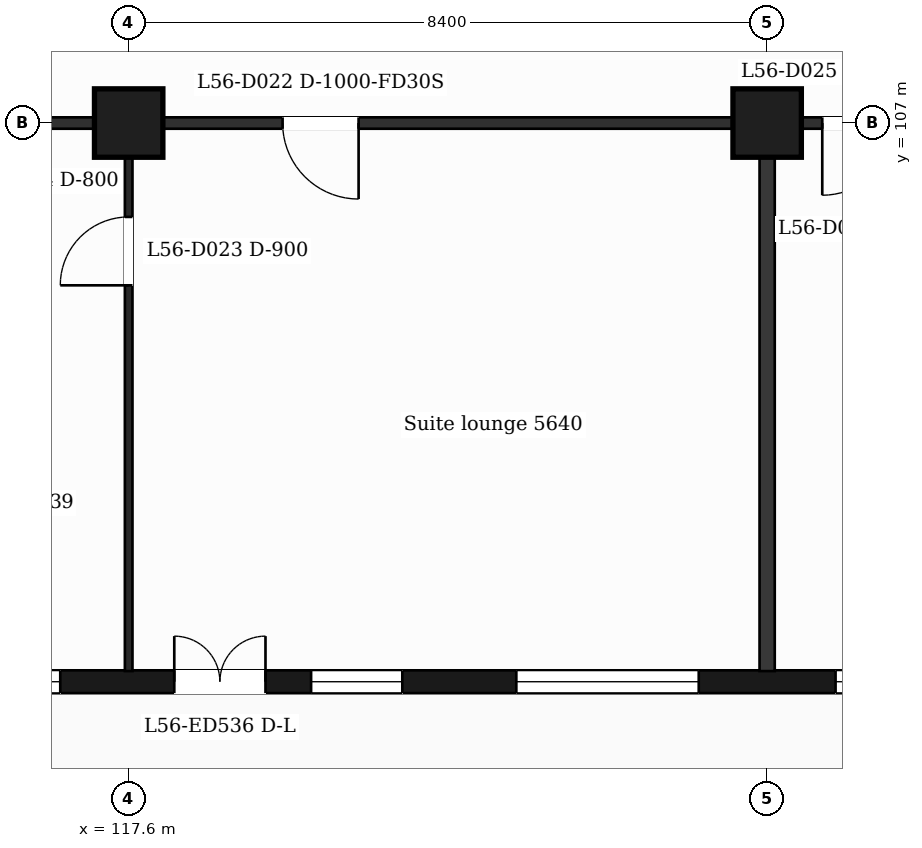
"""IFC4 building model, lengths in metres.
Left out: names, types, materials, properties, quantities, classifications, styles, units other than length and angle.
Written with IfcOpenShell. Run it as: python <this file> out.ifc"""

import sys

from ifc_helpers import new_model, si_unit, direction, frame, frame_2d, origin, origin_2d, place, context, subcontext, project, spatial, rectangle, extrude, element, fill, save


model = new_model("IFC4")
c1 = context("Model", 3, precision=1e-05, world=origin(), true_north=direction((0.0, 1.0)))
c2 = subcontext(c1, "Body", "Model", "MODEL_VIEW")
j1 = project(units=[si_unit("LENGTHUNIT", "METRE"), si_unit("PLANEANGLEUNIT", "RADIAN")], contexts=[c1])
p1 = place(None, origin())
s1 = spatial("IfcSite", under=j1, at=p1, CompositionType="ELEMENT")
p2 = place(p1, origin())
s2 = spatial("IfcBuilding", under=s1, at=p2, CompositionType="ELEMENT")
p3 = place(p2, frame((0.0, 0.0, 231.8)))
s3 = spatial("IfcBuildingStorey", under=s2, at=p3, CompositionType="ELEMENT", Elevation=231.8)
for number, where, z_axis, x_axis in (
    (1, (117.6, 107.0, 0.0), (0.0, 0.0, 1.0), (1.0, 0.0, 0.0)),
    (2, (126.0, 107.0, 0.0), (0.0, 0.0, 1.0), (1.0, 0.0, 0.0)),
):
    element("IfcColumn", number, at=place(p3, frame(where, z_axis=z_axis, x_axis=x_axis)), inside=s3, PredefinedType="COLUMN", context=c2, shape_type="SweptSolid", body=[
        extrude(rectangle(XDim=0.9, YDim=0.9, at=origin_2d()), origin(), (0.0, 0.0, 1.0), 3.7),
    ])
p4 = place(p3, frame((89.85, 99.65, 0.0), z_axis=(0.0, 0.0, 1.0), x_axis=(1.0, 0.0, 0.0)))
e3 = element("IfcWall", 3, at=p4, inside=s3, PredefinedType="SOLIDWALL", context=c2, shape_type="SweptSolid", body=[
    extrude(rectangle(XDim=47.25, YDim=0.3, at=frame_2d((23.625, 0.0))), origin(), (0.0, 0.0, 1.0), 3.38),
])
p5 = place(p4, frame((0.725, 0.0, 0.9)))
e4 = element("IfcOpeningElement", 4, at=p5, cuts=e3, PredefinedType="OPENING", context=c2, shape_type="SweptSolid", body=[
    extrude(rectangle(XDim=1.2, YDim=2.1, at=frame_2d((0.6, 1.05))), frame((0.0, 0.16, 0.0), z_axis=(0.0, -1.0, 0.0), x_axis=(1.0, 0.0, 0.0)), (0.0, 0.0, 1.0), 0.32),
])
p6 = place(p4, frame((3.45, 0.0, 0.9)))
e5 = element("IfcOpeningElement", 5, at=p6, cuts=e3, PredefinedType="OPENING", context=c2, shape_type="SweptSolid", body=[
    extrude(rectangle(XDim=2.4, YDim=2.1, at=frame_2d((1.2, 1.05))), frame((0.0, 0.16, 0.0), z_axis=(0.0, -1.0, 0.0), x_axis=(1.0, 0.0, 0.0)), (0.0, 0.0, 1.0), 0.32),
])
p7 = place(p4, frame((7.65, 0.0, 0.9)))
e6 = element("IfcOpeningElement", 6, at=p7, cuts=e3, PredefinedType="OPENING", context=c2, shape_type="SweptSolid", body=[
    extrude(rectangle(XDim=2.4, YDim=2.1, at=frame_2d((1.2, 1.05))), frame((0.0, 0.16, 0.0), z_axis=(0.0, -1.0, 0.0), x_axis=(1.0, 0.0, 0.0)), (0.0, 0.0, 1.0), 0.32),
])
p8 = place(p4, frame((12.45, 0.0, 0.9)))
e7 = element("IfcOpeningElement", 7, at=p8, cuts=e3, PredefinedType="OPENING", context=c2, shape_type="SweptSolid", body=[
    extrude(rectangle(XDim=1.2, YDim=2.1, at=frame_2d((0.6, 1.05))), frame((0.0, 0.16, 0.0), z_axis=(0.0, -1.0, 0.0), x_axis=(1.0, 0.0, 0.0)), (0.0, 0.0, 1.0), 0.32),
])
p9 = place(p4, frame((16.65, 0.0, 0.9)))
e8 = element("IfcOpeningElement", 8, at=p9, cuts=e3, PredefinedType="OPENING", context=c2, shape_type="SweptSolid", body=[
    extrude(rectangle(XDim=1.2, YDim=2.1, at=frame_2d((0.6, 1.05))), frame((0.0, 0.16, 0.0), z_axis=(0.0, -1.0, 0.0), x_axis=(1.0, 0.0, 0.0)), (0.0, 0.0, 1.0), 0.32),
])
p10 = place(p4, frame((19.95, 0.0, 0.0)))
e9 = element("IfcOpeningElement", 9, at=p10, cuts=e3, PredefinedType="OPENING", context=c2, shape_type="SweptSolid", body=[
    extrude(rectangle(XDim=1.2, YDim=2.4, at=frame_2d((0.6, 1.2))), frame((0.0, 0.16, 0.0), z_axis=(0.0, -1.0, 0.0), x_axis=(1.0, 0.0, 0.0)), (0.0, 0.0, 1.0), 0.32),
])
p11 = place(p4, frame((21.75, 0.0, 0.9)))
e10 = element("IfcOpeningElement", 10, at=p11, cuts=e3, PredefinedType="OPENING", context=c2, shape_type="SweptSolid", body=[
    extrude(rectangle(XDim=1.2, YDim=2.1, at=frame_2d((0.6, 1.05))), frame((0.0, 0.16, 0.0), z_axis=(0.0, -1.0, 0.0), x_axis=(1.0, 0.0, 0.0)), (0.0, 0.0, 1.0), 0.32),
])
p12 = place(p4, frame((24.45, 0.0, 0.9)))
e11 = element("IfcOpeningElement", 11, at=p12, cuts=e3, PredefinedType="OPENING", context=c2, shape_type="SweptSolid", body=[
    extrude(rectangle(XDim=2.4, YDim=2.1, at=frame_2d((1.2, 1.05))), frame((0.0, 0.16, 0.0), z_axis=(0.0, -1.0, 0.0), x_axis=(1.0, 0.0, 0.0)), (0.0, 0.0, 1.0), 0.32),
])
p13 = place(p4, frame((28.35, 0.0, 0.0)))
e12 = element("IfcOpeningElement", 12, at=p13, cuts=e3, PredefinedType="OPENING", context=c2, shape_type="SweptSolid", body=[
    extrude(rectangle(XDim=1.2, YDim=2.4, at=frame_2d((0.6, 1.2))), frame((0.0, 0.16, 0.0), z_axis=(0.0, -1.0, 0.0), x_axis=(1.0, 0.0, 0.0)), (0.0, 0.0, 1.0), 0.32),
])
p14 = place(p4, frame((30.15, 0.0, 0.9)))
e13 = element("IfcOpeningElement", 13, at=p14, cuts=e3, PredefinedType="OPENING", context=c2, shape_type="SweptSolid", body=[
    extrude(rectangle(XDim=1.2, YDim=2.1, at=frame_2d((0.6, 1.05))), frame((0.0, 0.16, 0.0), z_axis=(0.0, -1.0, 0.0), x_axis=(1.0, 0.0, 0.0)), (0.0, 0.0, 1.0), 0.32),
])
p15 = place(p4, frame((32.85, 0.0, 0.9)))
e14 = element("IfcOpeningElement", 14, at=p15, cuts=e3, PredefinedType="OPENING", context=c2, shape_type="SweptSolid", body=[
    extrude(rectangle(XDim=2.4, YDim=2.1, at=frame_2d((1.2, 1.05))), frame((0.0, 0.16, 0.0), z_axis=(0.0, -1.0, 0.0), x_axis=(1.0, 0.0, 0.0)), (0.0, 0.0, 1.0), 0.32),
])
p16 = place(p4, frame((37.05, 0.0, 0.9)))
e15 = element("IfcOpeningElement", 15, at=p16, cuts=e3, PredefinedType="OPENING", context=c2, shape_type="SweptSolid", body=[
    extrude(rectangle(XDim=2.4, YDim=2.1, at=frame_2d((1.2, 1.05))), frame((0.0, 0.16, 0.0), z_axis=(0.0, -1.0, 0.0), x_axis=(1.0, 0.0, 0.0)), (0.0, 0.0, 1.0), 0.32),
])
p17 = place(p4, frame((41.85, 0.0, 0.9)))
e16 = element("IfcOpeningElement", 16, at=p17, cuts=e3, PredefinedType="OPENING", context=c2, shape_type="SweptSolid", body=[
    extrude(rectangle(XDim=1.2, YDim=2.1, at=frame_2d((0.6, 1.05))), frame((0.0, 0.16, 0.0), z_axis=(0.0, -1.0, 0.0), x_axis=(1.0, 0.0, 0.0)), (0.0, 0.0, 1.0), 0.32),
])
p18 = place(p4, frame((45.25, 0.0, 0.9)))
e17 = element("IfcOpeningElement", 17, at=p18, cuts=e3, PredefinedType="OPENING", context=c2, shape_type="SweptSolid", body=[
    extrude(rectangle(XDim=1.2, YDim=2.1, at=frame_2d((0.6, 1.05))), frame((0.0, 0.16, 0.0), z_axis=(0.0, -1.0, 0.0), x_axis=(1.0, 0.0, 0.0)), (0.0, 0.0, 1.0), 0.32),
])
p19 = place(p3, frame((87.018, 107.0, 0.0), z_axis=(0.0, 0.0, 1.0), x_axis=(1.0, 0.0, 0.0)))
e18 = element("IfcWall", 18, at=p19, inside=s3, PredefinedType="PARTITIONING", context=c2, shape_type="SweptSolid", body=[
    extrude(rectangle(XDim=52.765, YDim=0.15, at=frame_2d((26.382, 0.0))), origin(), (0.0, 0.0, 1.0), 3.38),
])
p20 = place(p19, frame((0.707, 0.0, 0.0)))
e19 = element("IfcOpeningElement", 19, at=p20, cuts=e18, PredefinedType="OPENING", context=c2, shape_type="SweptSolid", body=[
    extrude(rectangle(XDim=0.95, YDim=2.1, at=frame_2d((0.475, 1.05))), frame((0.0, 0.085, 0.0), z_axis=(0.0, -1.0, 0.0), x_axis=(1.0, 0.0, 0.0)), (0.0, 0.0, 1.0), 0.17),
])
p21 = place(p19, frame((8.412, 0.0, 0.0)))
e20 = element("IfcOpeningElement", 20, at=p21, cuts=e18, PredefinedType="OPENING", context=c2, shape_type="SweptSolid", body=[
    extrude(rectangle(XDim=1.0, YDim=2.1, at=frame_2d((0.5, 1.05))), frame((0.0, 0.085, 0.0), z_axis=(0.0, -1.0, 0.0), x_axis=(1.0, 0.0, 0.0)), (0.0, 0.0, 1.0), 0.17),
])
p22 = place(p19, frame((20.482, 0.0, 0.0)))
e21 = element("IfcOpeningElement", 21, at=p22, cuts=e18, PredefinedType="OPENING", context=c2, shape_type="SweptSolid", body=[
    extrude(rectangle(XDim=1.0, YDim=2.1, at=frame_2d((0.5, 1.05))), frame((0.0, 0.085, 0.0), z_axis=(0.0, -1.0, 0.0), x_axis=(1.0, 0.0, 0.0)), (0.0, 0.0, 1.0), 0.17),
])
p23 = place(p19, frame((22.882, 0.0, 0.0)))
e22 = element("IfcOpeningElement", 22, at=p23, cuts=e18, PredefinedType="OPENING", context=c2, shape_type="SweptSolid", body=[
    extrude(rectangle(XDim=1.0, YDim=2.1, at=frame_2d((0.5, 1.05))), frame((0.0, 0.085, 0.0), z_axis=(0.0, -1.0, 0.0), x_axis=(1.0, 0.0, 0.0)), (0.0, 0.0, 1.0), 0.17),
])
p24 = place(p19, frame((32.607, 0.0, 0.0)))
e23 = element("IfcOpeningElement", 23, at=p24, cuts=e18, PredefinedType="OPENING", context=c2, shape_type="SweptSolid", body=[
    extrude(rectangle(XDim=1.0, YDim=2.1, at=frame_2d((0.5, 1.05))), frame((0.0, 0.085, 0.0), z_axis=(0.0, -1.0, 0.0), x_axis=(1.0, 0.0, 0.0)), (0.0, 0.0, 1.0), 0.17),
])
p25 = place(p19, frame((39.707, 0.0, 0.0)))
e24 = element("IfcOpeningElement", 24, at=p25, cuts=e18, PredefinedType="OPENING", context=c2, shape_type="SweptSolid", body=[
    extrude(rectangle(XDim=0.95, YDim=2.1, at=frame_2d((0.475, 1.05))), frame((0.0, 0.085, 0.0), z_axis=(0.0, -1.0, 0.0), x_axis=(1.0, 0.0, 0.0)), (0.0, 0.0, 1.0), 0.17),
])
p26 = place(p19, frame((43.457, 0.0, 0.0)))
e25 = element("IfcOpeningElement", 25, at=p26, cuts=e18, PredefinedType="OPENING", context=c2, shape_type="SweptSolid", body=[
    extrude(rectangle(XDim=0.95, YDim=2.1, at=frame_2d((0.475, 1.05))), frame((0.0, 0.085, 0.0), z_axis=(0.0, -1.0, 0.0), x_axis=(1.0, 0.0, 0.0)), (0.0, 0.0, 1.0), 0.17),
])
p27 = place(p19, frame((49.285, 0.0, 0.0)))
e26 = element("IfcOpeningElement", 26, at=p27, cuts=e18, PredefinedType="OPENING", context=c2, shape_type="SweptSolid", body=[
    extrude(rectangle(XDim=0.95, YDim=2.1, at=frame_2d((0.475, 1.05))), frame((0.0, 0.085, 0.0), z_axis=(0.0, -1.0, 0.0), x_axis=(1.0, 0.0, 0.0)), (0.0, 0.0, 1.0), 0.17),
])
p28 = place(p3, frame((117.6, 99.79, 0.0), z_axis=(0.0, 0.0, 1.0), x_axis=(0.0, 1.0, 0.0)))
e27 = element("IfcWall", 27, at=p28, inside=s3, PredefinedType="PARTITIONING", context=c2, shape_type="SweptSolid", body=[
    extrude(rectangle(XDim=7.135, YDim=0.1, at=frame_2d((3.567, 0.0))), origin(), (0.0, 0.0, 1.0), 3.38),
])
p29 = place(p28, frame((5.075, 0.0, 0.0)))
e28 = element("IfcOpeningElement", 28, at=p29, cuts=e27, PredefinedType="OPENING", context=c2, shape_type="SweptSolid", body=[
    extrude(rectangle(XDim=0.9, YDim=2.1, at=frame_2d((0.45, 1.05))), frame((0.0, 0.06, 0.0), z_axis=(0.0, -1.0, 0.0), x_axis=(1.0, 0.0, 0.0)), (0.0, 0.0, 1.0), 0.12),
])
p30 = place(p3, frame((126.0, 99.79, 0.0), z_axis=(0.0, 0.0, 1.0), x_axis=(0.0, 1.0, 0.0)))
e29 = element("IfcWall", 29, at=p30, inside=s3, PredefinedType="PARTITIONING", context=c2, shape_type="SweptSolid", body=[
    extrude(rectangle(XDim=7.135, YDim=0.2, at=frame_2d((3.567, 0.0))), origin(), (0.0, 0.0, 1.0), 3.38),
])
p31 = place(p12, origin())
e30 = element("IfcWindow", 30, at=p31, inside=s3, PartitioningType="SINGLE_PANEL", PredefinedType="WINDOW", context=c2, shape_type="SweptSolid", body=[
    extrude(rectangle(XDim=2.4, YDim=2.1, at=frame_2d((1.2, 1.05))), frame((0.0, 0.03, 0.0), z_axis=(0.0, -1.0, 0.0), x_axis=(1.0, 0.0, 0.0)), (0.0, 0.0, 1.0), 0.06),
])
fill(e11, e30)
p32 = place(p13, origin())
e31 = element("IfcDoor", 31, at=p32, inside=s3, OperationType="DOUBLE_DOOR_SINGLE_SWING", PredefinedType="DOOR", context=c2, shape_type="SweptSolid", body=[
    extrude(rectangle(XDim=1.2, YDim=2.4, at=frame_2d((0.6, 1.2))), frame((0.0, 0.025, 0.0), z_axis=(0.0, -1.0, 0.0), x_axis=(1.0, 0.0, 0.0)), (0.0, 0.0, 1.0), 0.05),
])
fill(e12, e31)
p33 = place(p14, origin())
e32 = element("IfcWindow", 32, at=p33, inside=s3, PartitioningType="SINGLE_PANEL", PredefinedType="WINDOW", context=c2, shape_type="SweptSolid", body=[
    extrude(rectangle(XDim=1.2, YDim=2.1, at=frame_2d((0.6, 1.05))), frame((0.0, 0.03, 0.0), z_axis=(0.0, -1.0, 0.0), x_axis=(1.0, 0.0, 0.0)), (0.0, 0.0, 1.0), 0.06),
])
fill(e13, e32)
p34 = place(p15, origin())
e33 = element("IfcWindow", 33, at=p34, inside=s3, PartitioningType="SINGLE_PANEL", PredefinedType="WINDOW", context=c2, shape_type="SweptSolid", body=[
    extrude(rectangle(XDim=2.4, YDim=2.1, at=frame_2d((1.2, 1.05))), frame((0.0, 0.03, 0.0), z_axis=(0.0, -1.0, 0.0), x_axis=(1.0, 0.0, 0.0)), (0.0, 0.0, 1.0), 0.06),
])
fill(e14, e33)
p35 = place(p16, origin())
e34 = element("IfcWindow", 34, at=p35, inside=s3, PartitioningType="SINGLE_PANEL", PredefinedType="WINDOW", context=c2, shape_type="SweptSolid", body=[
    extrude(rectangle(XDim=2.4, YDim=2.1, at=frame_2d((1.2, 1.05))), frame((0.0, 0.03, 0.0), z_axis=(0.0, -1.0, 0.0), x_axis=(1.0, 0.0, 0.0)), (0.0, 0.0, 1.0), 0.06),
])
fill(e15, e34)
p36 = place(p24, origin())
e35 = element("IfcDoor", 35, at=p36, inside=s3, OperationType="SINGLE_SWING_RIGHT", PredefinedType="DOOR", context=c2, shape_type="SweptSolid", body=[
    extrude(rectangle(XDim=1.0, YDim=2.1, at=frame_2d((0.5, 1.05))), frame((0.0, 0.025, 0.0), z_axis=(0.0, -1.0, 0.0), x_axis=(1.0, 0.0, 0.0)), (0.0, 0.0, 1.0), 0.05),
])
fill(e23, e35)
p37 = place(p29, origin())
e36 = element("IfcDoor", 36, at=p37, inside=s3, OperationType="SINGLE_SWING_LEFT", PredefinedType="DOOR", context=c2, shape_type="SweptSolid", body=[
    extrude(rectangle(XDim=0.9, YDim=2.1, at=frame_2d((0.45, 1.05))), frame((0.0, 0.025, 0.0), z_axis=(0.0, -1.0, 0.0), x_axis=(1.0, 0.0, 0.0)), (0.0, 0.0, 1.0), 0.05),
])
fill(e28, e36)
p38 = place(p25, origin())
e37 = element("IfcDoor", 37, at=p38, inside=s3, OperationType="SINGLE_SWING_LEFT", PredefinedType="DOOR", context=c2, shape_type="SweptSolid", body=[
    extrude(rectangle(XDim=0.95, YDim=2.1, at=frame_2d((0.475, 1.05))), frame((0.0, 0.025, 0.0), z_axis=(0.0, -1.0, 0.0), x_axis=(1.0, 0.0, 0.0)), (0.0, 0.0, 1.0), 0.05),
])
fill(e24, e37)
save(model, sys.argv[1])
